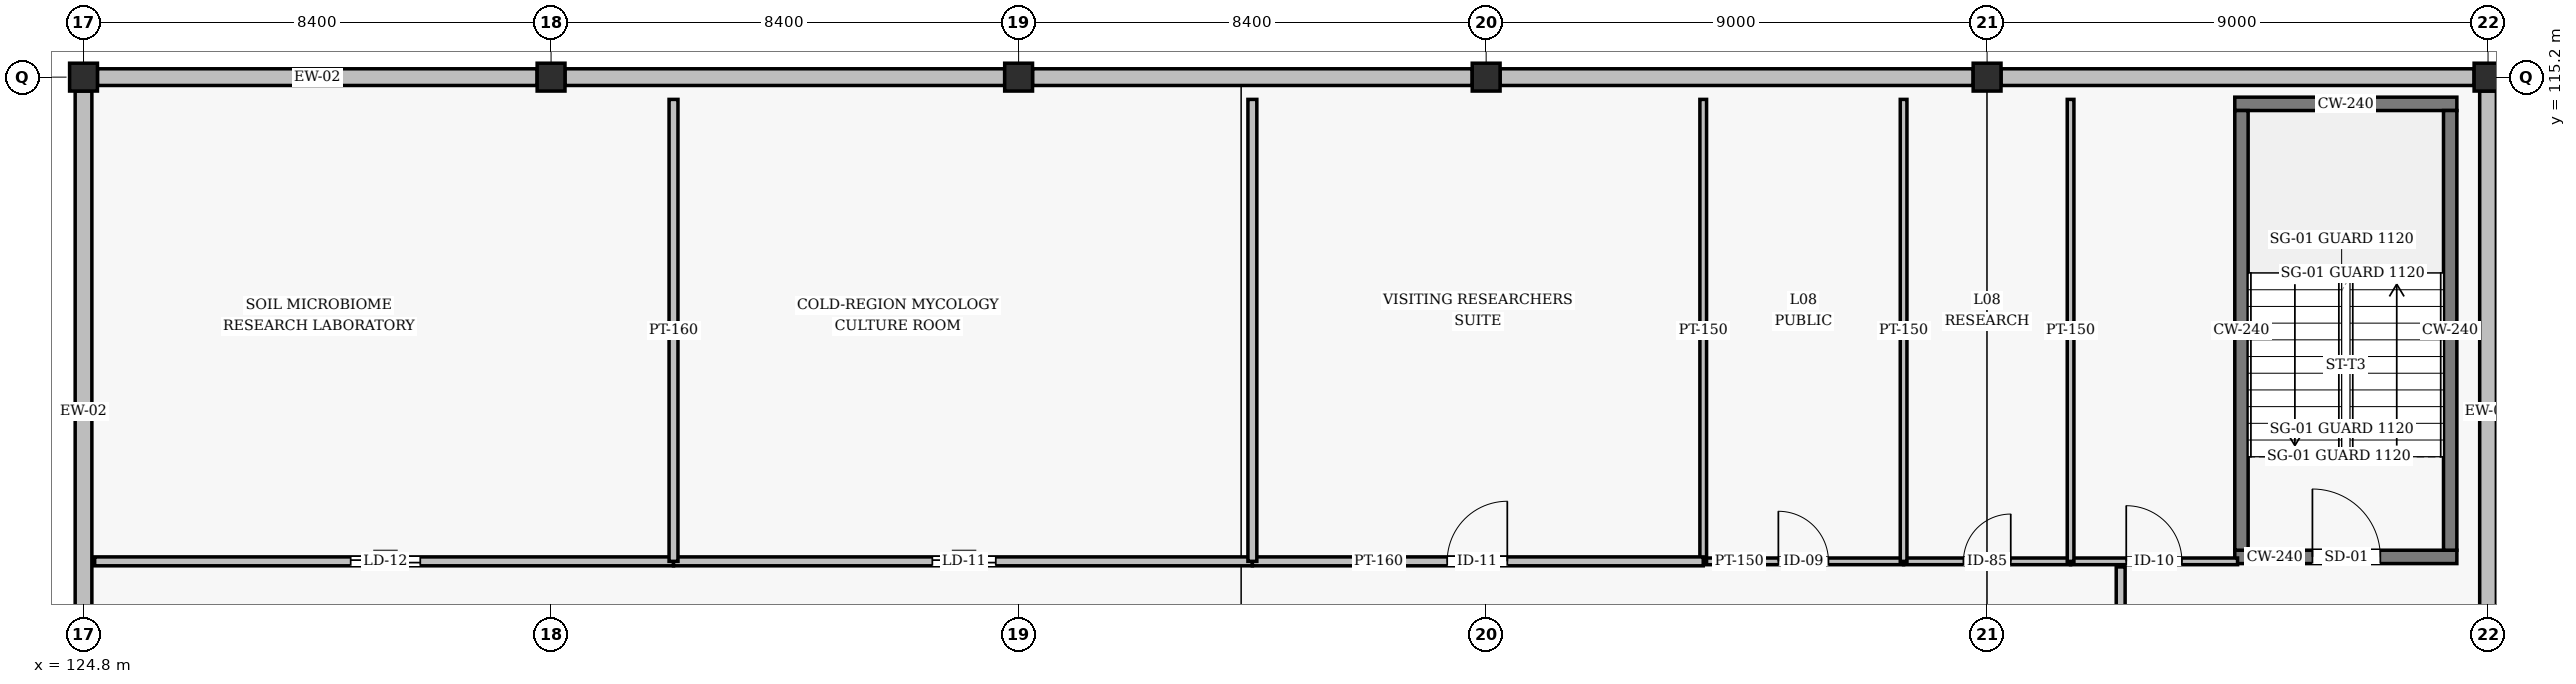
"""IFC4 building model, lengths in metres.
Left out: names, types, materials, properties, quantities, classifications, styles, units other than length and angle.
Written with IfcOpenShell. Run it as: python <this file> out.ifc"""

import sys

from ifc_helpers import new_model, si_unit, direction, frame, frame_2d, origin, origin_2d, place, context, subcontext, project, spatial, rectangle, hollow_rectangle, extrude, element, fill, save


model = new_model("IFC4")
c1 = context("Model", 3, precision=1e-05, world=origin(), true_north=direction((0.0, 1.0)))
c2 = subcontext(c1, "Body", "Model", "MODEL_VIEW")
j1 = project(units=[si_unit("LENGTHUNIT", "METRE"), si_unit("PLANEANGLEUNIT", "RADIAN")], contexts=[c1])
p1 = place(None, origin())
s1 = spatial("IfcSite", under=j1, at=p1, CompositionType="ELEMENT")
p2 = place(p1, origin())
s2 = spatial("IfcBuilding", under=s1, at=p2, CompositionType="ELEMENT")
p3 = place(p2, frame((0.0, 0.0, 31.8)))
s3 = spatial("IfcBuildingStorey", under=s2, at=p3, CompositionType="ELEMENT", Elevation=31.8)
for number, where, z_axis, x_axis in (
    (1, (124.8, 115.2, 0.0), (0.0, 0.0, 1.0), (1.0, 0.0, 0.0)),
    (2, (133.2, 115.2, 0.0), (0.0, 0.0, 1.0), (1.0, 0.0, 0.0)),
    (3, (141.6, 115.2, 0.0), (0.0, 0.0, 1.0), (1.0, 0.0, 0.0)),
    (4, (150.0, 115.2, 0.0), (0.0, 0.0, 1.0), (1.0, 0.0, 0.0)),
    (5, (159.0, 115.2, 0.0), (0.0, 0.0, 1.0), (1.0, 0.0, 0.0)),
    (6, (168.0, 115.2, 0.0), (0.0, 0.0, 1.0), (1.0, 0.0, 0.0)),
):
    element("IfcColumn", number, at=place(p3, frame(where, z_axis=z_axis, x_axis=x_axis)), inside=s3, PredefinedType="COLUMN", context=c2, shape_type="SweptSolid", body=[
        extrude(hollow_rectangle(XDim=0.5, YDim=0.5, WallThickness=0.02, InnerFilletRadius=0.02, OuterFilletRadius=0.04, at=origin_2d()), origin(), (0.0, 0.0, 1.0), 3.6),
    ])
p4 = place(p3, frame((168.0, 103.45, 0.0), z_axis=(0.0, 0.0, 1.0), x_axis=(0.0, 1.0, 0.0)))
e7 = element("IfcWall", 7, at=p4, inside=s3, PredefinedType="SOLIDWALL", context=c2, shape_type="SweptSolid", body=[
    extrude(rectangle(XDim=11.5, YDim=0.3, at=frame_2d((5.75, 0.0))), origin(), (0.0, 0.0, 1.0), 2.503),
])
for number, where, z_axis, x_axis in (
    (8, (167.75, 115.2, 0.0), (0.0, 0.0, 1.0), (-1.0, 0.0, 0.0)),
    (9, (158.75, 115.2, 0.0), (0.0, 0.0, 1.0), (-1.0, 0.0, 0.0)),
):
    element("IfcWall", number, at=place(p3, frame(where, z_axis=z_axis, x_axis=x_axis)), inside=s3, PredefinedType="SOLIDWALL", context=c2, shape_type="SweptSolid", body=[
        extrude(rectangle(XDim=8.5, YDim=0.3, at=frame_2d((4.25, 0.0))), origin(), (0.0, 0.0, 1.0), 2.503),
    ])
p5 = place(p3, frame((149.75, 115.2, 0.0), z_axis=(0.0, 0.0, 1.0), x_axis=(-1.0, 0.0, 0.0)))
e10 = element("IfcWall", 10, at=p5, inside=s3, PredefinedType="SOLIDWALL", context=c2, shape_type="SweptSolid", body=[
    extrude(rectangle(XDim=7.9, YDim=0.3, at=frame_2d((3.95, 0.0))), origin(), (0.0, 0.0, 1.0), 2.795),
])
p6 = place(p3, frame((141.35, 115.2, 0.0), z_axis=(0.0, 0.0, 1.0), x_axis=(-1.0, 0.0, 0.0)))
e11 = element("IfcWall", 11, at=p6, inside=s3, PredefinedType="SOLIDWALL", context=c2, shape_type="SweptSolid", body=[
    extrude(rectangle(XDim=7.9, YDim=0.3, at=frame_2d((3.95, 0.0))), origin(), (0.0, 0.0, 1.0), 2.795),
])
p7 = place(p3, frame((132.95, 115.2, 0.0), z_axis=(0.0, 0.0, 1.0), x_axis=(-1.0, 0.0, 0.0)))
e12 = element("IfcWall", 12, at=p7, inside=s3, PredefinedType="SOLIDWALL", context=c2, shape_type="SweptSolid", body=[
    extrude(rectangle(XDim=7.9, YDim=0.3, at=frame_2d((3.95, 0.0))), origin(), (0.0, 0.0, 1.0), 2.795),
])
p8 = place(p3, frame((124.8, 114.95, 0.0), z_axis=(0.0, 0.0, 1.0), x_axis=(0.0, -1.0, 0.0)))
e13 = element("IfcWall", 13, at=p8, inside=s3, PredefinedType="SOLIDWALL", context=c2, shape_type="SweptSolid", body=[
    extrude(rectangle(XDim=11.5, YDim=0.3, at=frame_2d((5.75, 0.0))), origin(), (0.0, 0.0, 1.0), 2.503),
])
p9 = place(p3, frame((163.45, 106.58, 0.0), z_axis=(0.0, 0.0, 1.0), x_axis=(1.0, 0.0, 0.0)))
e14 = element("IfcWall", 14, at=p9, inside=s3, PredefinedType="SHEAR", context=c2, shape_type="SweptSolid", body=[
    extrude(rectangle(XDim=3.99, YDim=0.24, at=frame_2d((1.995, 0.0))), origin(), (0.0, 0.0, 1.0), 3.295),
])
p10 = place(p9, frame((1.395, 0.0, 0.0)))
e15 = element("IfcOpeningElement", 15, at=p10, cuts=e14, PredefinedType="OPENING", context=c2, shape_type="SweptSolid", body=[
    extrude(rectangle(XDim=1.22, YDim=2.18, at=frame_2d((0.61, 1.09))), frame((0.0, 0.13, 0.0), z_axis=(0.0, -1.0, 0.0), x_axis=(1.0, 0.0, 0.0)), (0.0, 0.0, 1.0), 0.26),
])
p11 = place(p3, frame((163.45, 114.72, 0.0), z_axis=(0.0, 0.0, 1.0), x_axis=(1.0, 0.0, 0.0)))
e16 = element("IfcWall", 16, at=p11, inside=s3, PredefinedType="SHEAR", context=c2, shape_type="SweptSolid", body=[
    extrude(rectangle(XDim=3.99, YDim=0.24, at=frame_2d((1.995, 0.0))), origin(), (0.0, 0.0, 1.0), 3.295),
])
for number, where, z_axis, x_axis in (
    (17, (163.57, 106.7, 0.0), (0.0, 0.0, 1.0), (0.0, 1.0, 0.0)),
    (18, (167.32, 106.7, 0.0), (0.0, 0.0, 1.0), (0.0, 1.0, 0.0)),
):
    element("IfcWall", number, at=place(p3, frame(where, z_axis=z_axis, x_axis=x_axis)), inside=s3, PredefinedType="SHEAR", context=c2, shape_type="SweptSolid", body=[
        extrude(rectangle(XDim=7.9, YDim=0.24, at=frame_2d((3.95, 0.0))), origin(), (0.0, 0.0, 1.0), 3.295),
    ])
p12 = place(p3, frame((153.9, 106.5, 0.0), z_axis=(0.0, 0.0, 1.0), x_axis=(1.0, 0.0, 0.0)))
e19 = element("IfcWall", 19, at=p12, inside=s3, PredefinedType="PARTITIONING", context=c2, shape_type="SweptSolid", body=[
    extrude(rectangle(XDim=3.6, YDim=0.12, at=frame_2d((1.8, 0.0))), origin(), (0.0, 0.0, 1.0), 3.295),
])
p13 = place(p12, frame((1.35, 0.0, 0.0)))
e20 = element("IfcOpeningElement", 20, at=p13, cuts=e19, PredefinedType="OPENING", context=c2, shape_type="SweptSolid", body=[
    extrude(rectangle(XDim=0.9, YDim=2.1, at=frame_2d((0.45, 1.05))), frame((0.0, 0.07, 0.0), z_axis=(0.0, -1.0, 0.0), x_axis=(1.0, 0.0, 0.0)), (0.0, 0.0, 1.0), 0.14),
])
p14 = place(p3, frame((157.5, 106.5, 0.0), z_axis=(0.0, 0.0, 1.0), x_axis=(1.0, 0.0, 0.0)))
e21 = element("IfcWall", 21, at=p14, inside=s3, PredefinedType="PARTITIONING", context=c2, shape_type="SweptSolid", body=[
    extrude(rectangle(XDim=3.0, YDim=0.12, at=frame_2d((1.5, 0.0))), origin(), (0.0, 0.0, 1.0), 2.545),
])
p15 = place(p14, frame((1.075, 0.0, 0.0)))
e22 = element("IfcOpeningElement", 22, at=p15, cuts=e21, PredefinedType="OPENING", context=c2, shape_type="SweptSolid", body=[
    extrude(rectangle(XDim=0.85, YDim=2.1, at=frame_2d((0.425, 1.05))), frame((0.0, 0.07, 0.0), z_axis=(0.0, -1.0, 0.0), x_axis=(1.0, 0.0, 0.0)), (0.0, 0.0, 1.0), 0.14),
])
p16 = place(p3, frame((160.5, 106.5, 0.0), z_axis=(0.0, 0.0, 1.0), x_axis=(1.0, 0.0, 0.0)))
e23 = element("IfcWall", 23, at=p16, inside=s3, PredefinedType="PARTITIONING", context=c2, shape_type="SweptSolid", body=[
    extrude(rectangle(XDim=3.0, YDim=0.12, at=frame_2d((1.5, 0.0))), origin(), (0.0, 0.0, 1.0), 3.295),
])
p17 = place(p16, frame((1.0, 0.0, 0.0)))
e24 = element("IfcOpeningElement", 24, at=p17, cuts=e23, PredefinedType="OPENING", context=c2, shape_type="SweptSolid", body=[
    extrude(rectangle(XDim=1.0, YDim=2.1, at=frame_2d((0.5, 1.05))), frame((0.0, 0.07, 0.0), z_axis=(0.0, -1.0, 0.0), x_axis=(1.0, 0.0, 0.0)), (0.0, 0.0, 1.0), 0.14),
])
for number, where, z_axis, x_axis in (
    (25, (153.9, 106.5, 0.0), (0.0, 0.0, 1.0), (0.0, 1.0, 0.0)),
    (26, (157.5, 106.5, 0.0), (0.0, 0.0, 1.0), (0.0, 1.0, 0.0)),
):
    element("IfcWall", number, at=place(p3, frame(where, z_axis=z_axis, x_axis=x_axis)), inside=s3, PredefinedType="PARTITIONING", context=c2, shape_type="SweptSolid", body=[
        extrude(rectangle(XDim=8.3, YDim=0.12, at=frame_2d((4.15, 0.0))), origin(), (0.0, 0.0, 1.0), 2.895),
    ])
p18 = place(p3, frame((160.5, 106.5, 0.0), z_axis=(0.0, 0.0, 1.0), x_axis=(0.0, 1.0, 0.0)))
e27 = element("IfcWall", 27, at=p18, inside=s3, PredefinedType="PARTITIONING", context=c2, shape_type="SweptSolid", body=[
    extrude(rectangle(XDim=8.3, YDim=0.12, at=frame_2d((4.15, 0.0))), origin(), (0.0, 0.0, 1.0), 3.295),
])
p19 = place(p3, frame((161.4, 92.3, 0.0), z_axis=(0.0, 0.0, 1.0), x_axis=(0.0, 1.0, 0.0)))
e28 = element("IfcWall", 28, at=p19, inside=s3, PredefinedType="PARTITIONING", context=c2, shape_type="SweptSolid", body=[
    extrude(rectangle(XDim=14.1, YDim=0.16, at=frame_2d((7.05, 0.0))), origin(), (0.0, 0.0, 1.0), 2.695),
])
p20 = place(p19, frame((6.5, 0.0, 0.0)))
e29 = element("IfcOpeningElement", 29, at=p20, cuts=e28, PredefinedType="OPENING", context=c2, shape_type="SweptSolid", body=[
    extrude(rectangle(XDim=1.08, YDim=2.08, at=frame_2d((0.54, 1.04))), frame((0.0, 0.09, 0.0), z_axis=(0.0, -1.0, 0.0), x_axis=(1.0, 0.0, 0.0)), (0.0, 0.0, 1.0), 0.18),
])
p21 = place(p3, frame((125.0, 106.5, 0.0), z_axis=(0.0, 0.0, 1.0), x_axis=(1.0, 0.0, 0.0)))
e30 = element("IfcWall", 30, at=p21, inside=s3, PredefinedType="PARTITIONING", context=c2, shape_type="SweptSolid", body=[
    extrude(rectangle(XDim=10.4, YDim=0.16, at=frame_2d((5.2, 0.0))), origin(), (0.0, 0.0, 1.0), 2.545),
])
p22 = place(p21, frame((4.6, 0.0, 0.0)))
e31 = element("IfcOpeningElement", 31, at=p22, cuts=e30, PredefinedType="OPENING", context=c2, shape_type="SweptSolid", body=[
    extrude(rectangle(XDim=1.25, YDim=2.12, at=frame_2d((0.625, 1.06))), frame((0.0, 0.09, 0.0), z_axis=(0.0, -1.0, 0.0), x_axis=(1.0, 0.0, 0.0)), (0.0, 0.0, 1.0), 0.18),
])
p23 = place(p3, frame((135.4, 106.5, 0.0), z_axis=(0.0, 0.0, 1.0), x_axis=(1.0, 0.0, 0.0)))
e32 = element("IfcWall", 32, at=p23, inside=s3, PredefinedType="PARTITIONING", context=c2, shape_type="SweptSolid", body=[
    extrude(rectangle(XDim=10.4, YDim=0.16, at=frame_2d((5.2, 0.0))), origin(), (0.0, 0.0, 1.0), 2.545),
])
p24 = place(p23, frame((4.65, 0.0, 0.0)))
e33 = element("IfcOpeningElement", 33, at=p24, cuts=e32, PredefinedType="OPENING", context=c2, shape_type="SweptSolid", body=[
    extrude(rectangle(XDim=1.14, YDim=2.12, at=frame_2d((0.57, 1.06))), frame((0.0, 0.09, 0.0), z_axis=(0.0, -1.0, 0.0), x_axis=(1.0, 0.0, 0.0)), (0.0, 0.0, 1.0), 0.18),
])
p25 = place(p3, frame((145.8, 106.5, 0.0), z_axis=(0.0, 0.0, 1.0), x_axis=(1.0, 0.0, 0.0)))
e34 = element("IfcWall", 34, at=p25, inside=s3, PredefinedType="PARTITIONING", context=c2, shape_type="SweptSolid", body=[
    extrude(rectangle(XDim=8.1, YDim=0.16, at=frame_2d((4.05, 0.0))), origin(), (0.0, 0.0, 1.0), 2.545),
])
p26 = place(p25, frame((3.5, 0.0, 0.0)))
e35 = element("IfcOpeningElement", 35, at=p26, cuts=e34, PredefinedType="OPENING", context=c2, shape_type="SweptSolid", body=[
    extrude(rectangle(XDim=1.08, YDim=2.08, at=frame_2d((0.54, 1.04))), frame((0.0, 0.09, 0.0), z_axis=(0.0, -1.0, 0.0), x_axis=(1.0, 0.0, 0.0)), (0.0, 0.0, 1.0), 0.18),
])
for number, where, z_axis, x_axis in (
    (36, (135.4, 106.5, 0.0), (0.0, 0.0, 1.0), (0.0, 1.0, 0.0)),
    (37, (145.8, 106.5, 0.0), (0.0, 0.0, 1.0), (0.0, 1.0, 0.0)),
):
    element("IfcWall", number, at=place(p3, frame(where, z_axis=z_axis, x_axis=x_axis)), inside=s3, PredefinedType="PARTITIONING", context=c2, shape_type="SweptSolid", body=[
        extrude(rectangle(XDim=8.3, YDim=0.16, at=frame_2d((4.15, 0.0))), origin(), (0.0, 0.0, 1.0), 2.945),
    ])
p27 = place(p10, origin())
e38 = element("IfcDoor", 38, at=p27, inside=s3, OperationType="SINGLE_SWING_LEFT", PredefinedType="DOOR", context=c2, shape_type="SweptSolid", body=[
    extrude(rectangle(XDim=1.22, YDim=2.18, at=frame_2d((0.61, 1.09))), frame((0.0, 0.025, 0.0), z_axis=(0.0, -1.0, 0.0), x_axis=(1.0, 0.0, 0.0)), (0.0, 0.0, 1.0), 0.05),
])
fill(e15, e38)
p28 = place(p13, origin())
e39 = element("IfcDoor", 39, at=p28, inside=s3, OperationType="SINGLE_SWING_LEFT", PredefinedType="DOOR", context=c2, shape_type="SweptSolid", body=[
    extrude(rectangle(XDim=0.9, YDim=2.1, at=frame_2d((0.45, 1.05))), frame((0.0, 0.025, 0.0), z_axis=(0.0, -1.0, 0.0), x_axis=(1.0, 0.0, 0.0)), (0.0, 0.0, 1.0), 0.05),
])
fill(e20, e39)
p29 = place(p15, origin())
e40 = element("IfcDoor", 40, at=p29, inside=s3, OperationType="SINGLE_SWING_RIGHT", PredefinedType="DOOR", context=c2, shape_type="SweptSolid", body=[
    extrude(rectangle(XDim=0.85, YDim=2.1, at=frame_2d((0.425, 1.05))), frame((0.0, 0.025, 0.0), z_axis=(0.0, -1.0, 0.0), x_axis=(1.0, 0.0, 0.0)), (0.0, 0.0, 1.0), 0.05),
])
fill(e22, e40)
p30 = place(p17, origin())
e41 = element("IfcDoor", 41, at=p30, inside=s3, OperationType="SINGLE_SWING_LEFT", PredefinedType="DOOR", context=c2, shape_type="SweptSolid", body=[
    extrude(rectangle(XDim=1.0, YDim=2.1, at=frame_2d((0.5, 1.05))), frame((0.0, 0.025, 0.0), z_axis=(0.0, -1.0, 0.0), x_axis=(1.0, 0.0, 0.0)), (0.0, 0.0, 1.0), 0.05),
])
fill(e24, e41)
p31 = place(p22, origin())
e42 = element("IfcDoor", 42, at=p31, inside=s3, OperationType="SINGLE_SWING_LEFT", PredefinedType="DOOR", context=c2, shape_type="SweptSolid", body=[
    extrude(rectangle(XDim=1.25, YDim=2.12, at=frame_2d((0.625, 1.06))), frame((0.0, 0.025, 0.0), z_axis=(0.0, -1.0, 0.0), x_axis=(1.0, 0.0, 0.0)), (0.0, 0.0, 1.0), 0.05),
])
fill(e31, e42)
p32 = place(p24, origin())
e43 = element("IfcDoor", 43, at=p32, inside=s3, OperationType="SINGLE_SWING_RIGHT", PredefinedType="DOOR", context=c2, shape_type="SweptSolid", body=[
    extrude(rectangle(XDim=1.14, YDim=2.12, at=frame_2d((0.57, 1.06))), frame((0.0, 0.025, 0.0), z_axis=(0.0, -1.0, 0.0), x_axis=(1.0, 0.0, 0.0)), (0.0, 0.0, 1.0), 0.05),
])
fill(e33, e43)
p33 = place(p26, origin())
e44 = element("IfcDoor", 44, at=p33, inside=s3, OperationType="SINGLE_SWING_RIGHT", PredefinedType="DOOR", context=c2, shape_type="SweptSolid", body=[
    extrude(rectangle(XDim=1.08, YDim=2.08, at=frame_2d((0.54, 1.04))), frame((0.0, 0.025, 0.0), z_axis=(0.0, -1.0, 0.0), x_axis=(1.0, 0.0, 0.0)), (0.0, 0.0, 1.0), 0.05),
])
fill(e35, e44)
save(model, sys.argv[1])
